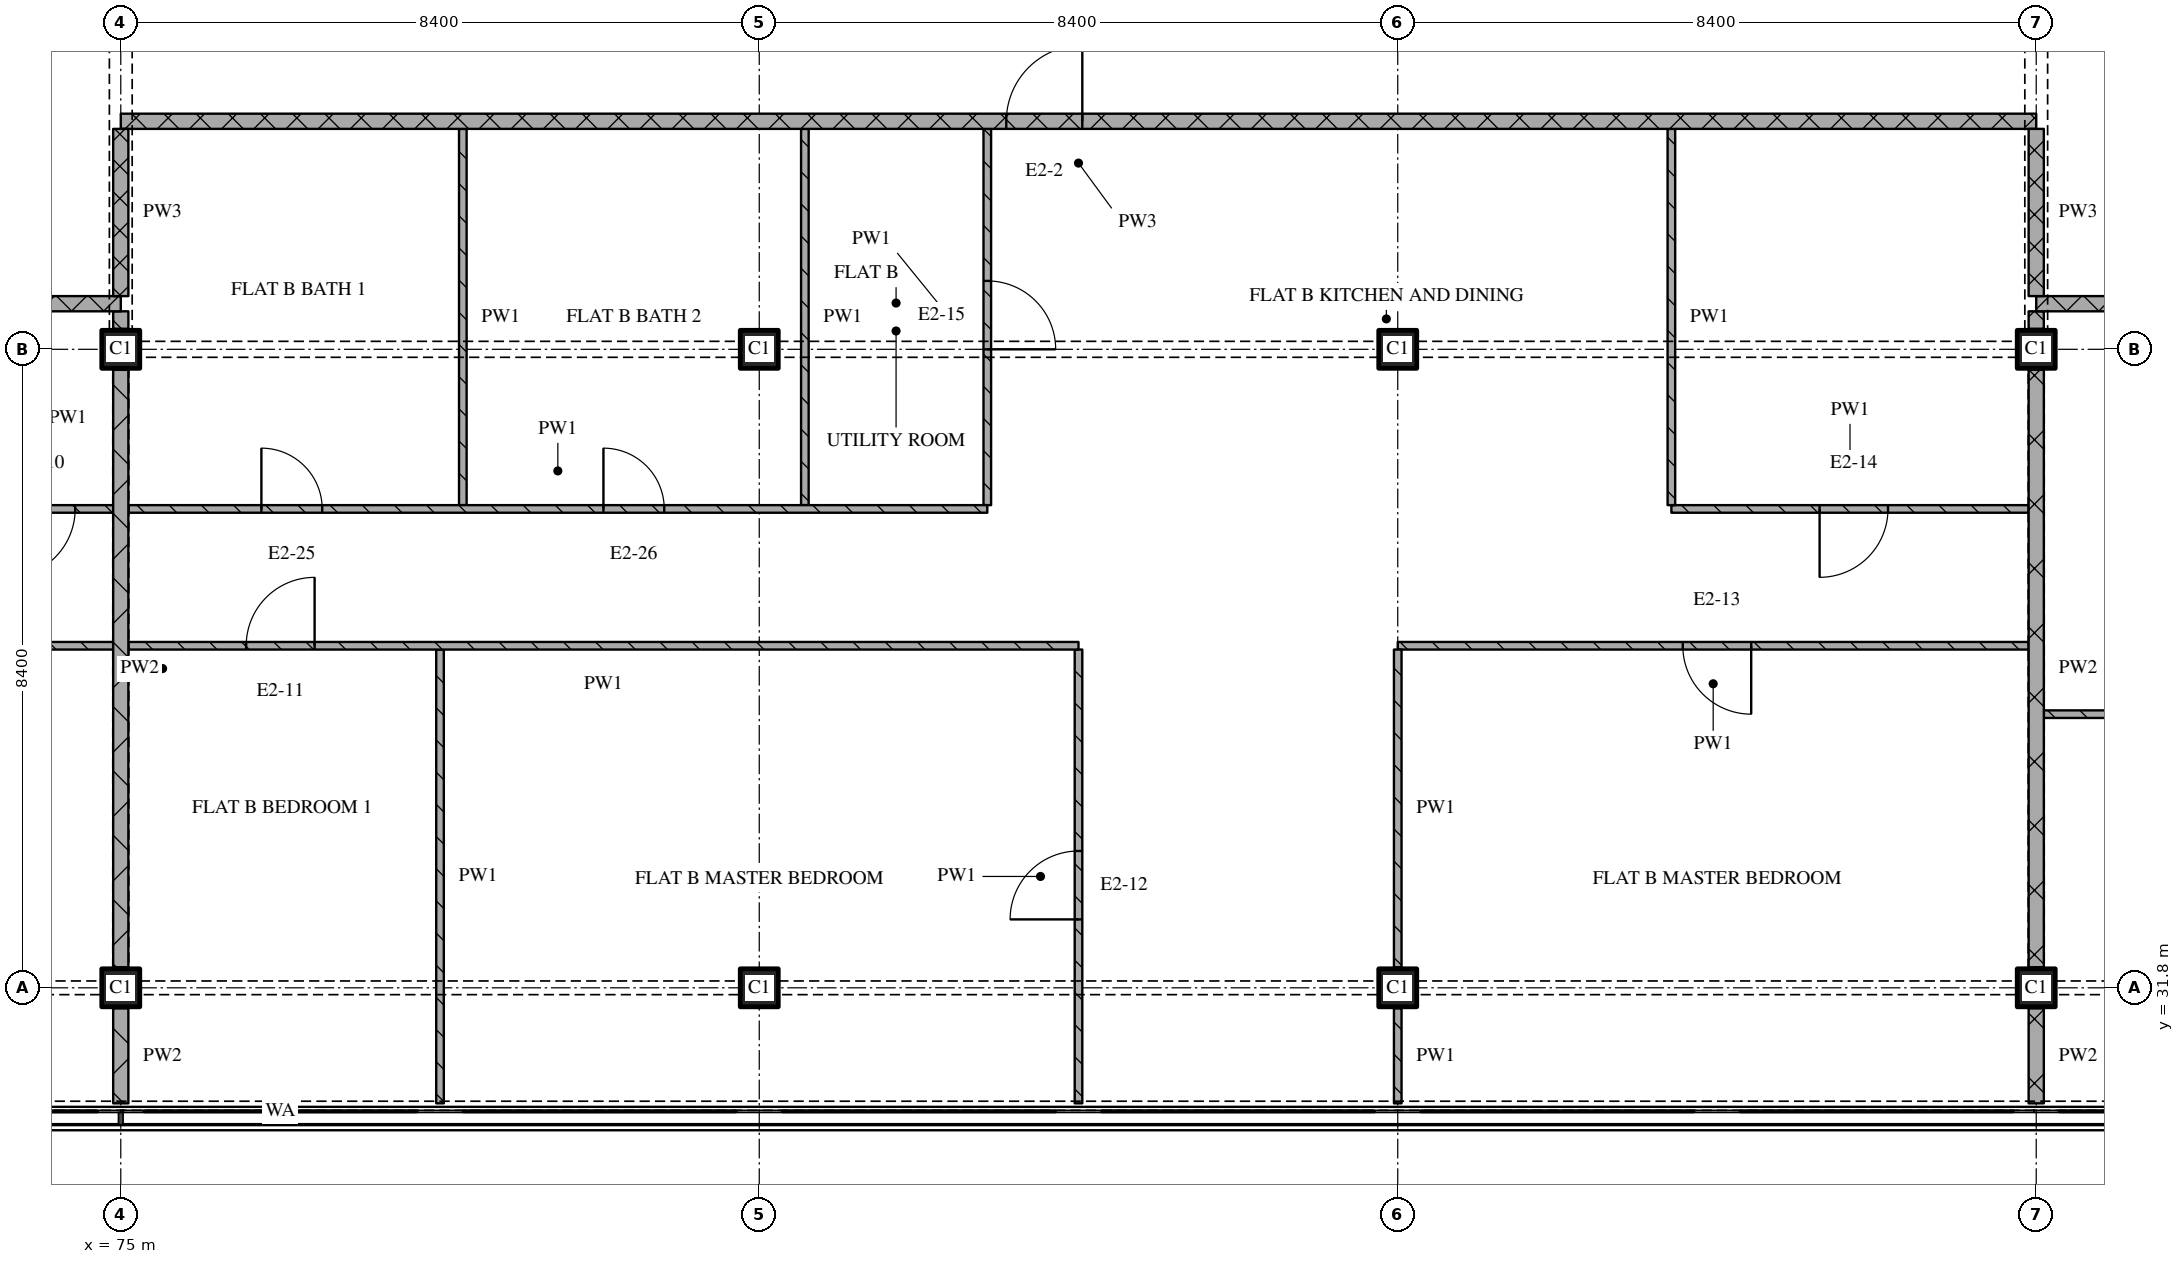
"""IFC4 building model, lengths in metres.
Left out: names, types, materials, properties, quantities, classifications, styles, units other than length and angle.
Written with IfcOpenShell. Run it as: python <this file> out.ifc"""

import sys

from ifc_helpers import new_model, si_unit, direction, frame, frame_2d, origin, origin_2d, place, context, subcontext, project, spatial, rectangle, extrude, element, fill, save


model = new_model("IFC4")
c1 = context("Model", 3, precision=1e-05, world=origin(), true_north=direction((0.0, 1.0)))
c2 = subcontext(c1, "Body", "Model", "MODEL_VIEW")
j1 = project(units=[si_unit("LENGTHUNIT", "METRE"), si_unit("PLANEANGLEUNIT", "RADIAN")], contexts=[c1])
p1 = place(None, origin())
s1 = spatial("IfcSite", under=j1, at=p1, CompositionType="ELEMENT")
p2 = place(p1, origin())
s2 = spatial("IfcBuilding", under=s1, at=p2, CompositionType="ELEMENT")
p3 = place(p2, frame((0.0, 0.0, 270.75)))
s3 = spatial("IfcBuildingStorey", under=s2, at=p3, CompositionType="ELEMENT", Elevation=270.75)
for number, where, z_axis, x_axis in (
    (1, (75.0, 31.8, 0.0), (0.0, 0.0, 1.0), (1.0, 0.0, 0.0)),
    (2, (75.0, 40.2, 0.0), (0.0, 0.0, 1.0), (1.0, 0.0, 0.0)),
    (3, (83.4, 31.8, 0.0), (0.0, 0.0, 1.0), (1.0, 0.0, 0.0)),
    (4, (83.4, 40.2, 0.0), (0.0, 0.0, 1.0), (1.0, 0.0, 0.0)),
    (5, (91.8, 31.8, 0.0), (0.0, 0.0, 1.0), (1.0, 0.0, 0.0)),
    (6, (91.8, 40.2, 0.0), (0.0, 0.0, 1.0), (1.0, 0.0, 0.0)),
    (7, (100.2, 31.8, 0.0), (0.0, 0.0, 1.0), (1.0, 0.0, 0.0)),
    (8, (100.2, 40.2, 0.0), (0.0, 0.0, 1.0), (1.0, 0.0, 0.0)),
):
    element("IfcColumn", number, at=place(p3, frame(where, z_axis=z_axis, x_axis=x_axis)), inside=s3, PredefinedType="COLUMN", context=c2, shape_type="SweptSolid", body=[
        extrude(rectangle(XDim=0.5, YDim=0.5, at=origin_2d()), origin(), (0.0, 0.0, 1.0), 3.6),
    ])
p4 = place(p3, frame((100.3, 35.4, 0.0), z_axis=(0.0, 0.0, 1.0), x_axis=(1.0, 0.0, 0.0)))
e9 = element("IfcWall", 9, at=p4, inside=s3, PredefinedType="PARTITIONING", context=c2, shape_type="SweptSolid", body=[
    extrude(rectangle(XDim=8.3, YDim=0.1, at=frame_2d((4.15, 0.0))), origin(), (0.0, 0.0, 1.0), 3.32),
])
p5 = place(p3, frame((100.1, 36.3, 0.0), z_axis=(0.0, 0.0, 1.0), x_axis=(-1.0, 0.0, 0.0)))
e10 = element("IfcWall", 10, at=p5, inside=s3, PredefinedType="PARTITIONING", context=c2, shape_type="SweptSolid", body=[
    extrude(rectangle(XDim=8.3, YDim=0.1, at=frame_2d((4.15, 0.0))), origin(), (0.0, 0.0, 1.0), 3.32),
])
p6 = place(p5, frame((3.65, 0.0, 0.0)))
e11 = element("IfcOpeningElement", 11, at=p6, cuts=e10, PredefinedType="OPENING", context=c2, shape_type="SweptSolid", body=[
    extrude(rectangle(XDim=0.9, YDim=2.1, at=frame_2d((0.45, 1.05))), frame((0.0, 0.06, 0.0), z_axis=(0.0, -1.0, 0.0), x_axis=(1.0, 0.0, 0.0)), (0.0, 0.0, 1.0), 0.12),
])
p7 = place(p3, frame((95.4, 38.1, 0.0), z_axis=(0.0, 0.0, 1.0), x_axis=(1.0, 0.0, 0.0)))
e12 = element("IfcWall", 12, at=p7, inside=s3, PredefinedType="PARTITIONING", context=c2, shape_type="SweptSolid", body=[
    extrude(rectangle(XDim=4.7, YDim=0.1, at=frame_2d((2.35, 0.0))), origin(), (0.0, 0.0, 1.0), 3.32),
])
p8 = place(p7, frame((1.95, 0.0, 0.0)))
e13 = element("IfcOpeningElement", 13, at=p8, cuts=e12, PredefinedType="OPENING", context=c2, shape_type="SweptSolid", body=[
    extrude(rectangle(XDim=0.9, YDim=2.1, at=frame_2d((0.45, 1.05))), frame((0.0, 0.06, 0.0), z_axis=(0.0, -1.0, 0.0), x_axis=(1.0, 0.0, 0.0)), (0.0, 0.0, 1.0), 0.12),
])
p9 = place(p3, frame((75.0, 40.8, 0.0), z_axis=(0.0, 0.0, 1.0), x_axis=(-1.0, 0.0, 0.0)))
e14 = element("IfcWall", 14, at=p9, inside=s3, PredefinedType="PARTITIONING", context=c2, shape_type="SweptSolid", body=[
    extrude(rectangle(XDim=18.32, YDim=0.2, at=frame_2d((9.16, 0.0))), origin(), (0.0, 0.0, 1.0), 3.32),
])
p10 = place(p9, frame((9.85, 0.0, 0.0)))
e15 = element("IfcOpeningElement", 15, at=p10, cuts=e14, PredefinedType="OPENING", context=c2, shape_type="SweptSolid", body=[
    extrude(rectangle(XDim=1.0, YDim=2.1, at=frame_2d((0.5, 1.05))), frame((0.0, 0.11, 0.0), z_axis=(0.0, -1.0, 0.0), x_axis=(1.0, 0.0, 0.0)), (0.0, 0.0, 1.0), 0.22),
])
p11 = place(p3, frame((118.52, 40.8, 0.0), z_axis=(0.0, 0.0, 1.0), x_axis=(-1.0, 0.0, 0.0)))
e16 = element("IfcWall", 16, at=p11, inside=s3, PredefinedType="PARTITIONING", context=c2, shape_type="SweptSolid", body=[
    extrude(rectangle(XDim=18.32, YDim=0.2, at=frame_2d((9.16, 0.0))), origin(), (0.0, 0.0, 1.0), 3.32),
])
p12 = place(p11, frame((7.17, 0.0, 0.0)))
e17 = element("IfcOpeningElement", 17, at=p12, cuts=e16, PredefinedType="OPENING", context=c2, shape_type="SweptSolid", body=[
    extrude(rectangle(XDim=1.0, YDim=2.1, at=frame_2d((0.5, 1.05))), frame((0.0, 0.11, 0.0), z_axis=(0.0, -1.0, 0.0), x_axis=(1.0, 0.0, 0.0)), (0.0, 0.0, 1.0), 0.22),
])
p13 = place(p3, frame((100.2, 43.2, 0.0), z_axis=(0.0, 0.0, 1.0), x_axis=(-1.0, 0.0, 0.0)))
e18 = element("IfcWall", 18, at=p13, inside=s3, PredefinedType="PARTITIONING", context=c2, shape_type="SweptSolid", body=[
    extrude(rectangle(XDim=25.2, YDim=0.2, at=frame_2d((12.6, 0.0))), origin(), (0.0, 0.0, 1.0), 3.32),
])
p14 = place(p13, frame((12.55, 0.0, 0.0)))
e19 = element("IfcOpeningElement", 19, at=p14, cuts=e18, PredefinedType="OPENING", context=c2, shape_type="SweptSolid", body=[
    extrude(rectangle(XDim=1.0, YDim=2.1, at=frame_2d((0.5, 1.05))), frame((0.0, 0.11, 0.0), z_axis=(0.0, -1.0, 0.0), x_axis=(1.0, 0.0, 0.0)), (0.0, 0.0, 1.0), 0.22),
])
p15 = place(p3, frame((75.0, 43.1, 0.0), z_axis=(0.0, 0.0, 1.0), x_axis=(0.0, -1.0, 0.0)))
e20 = element("IfcWall", 20, at=p15, inside=s3, PredefinedType="PARTITIONING", context=c2, shape_type="SweptSolid", body=[
    extrude(rectangle(XDim=2.2, YDim=0.2, at=frame_2d((1.1, 0.0))), origin(), (0.0, 0.0, 1.0), 2.53),
])
p16 = place(p3, frame((75.0, 31.53, 0.0), z_axis=(0.0, 0.0, 1.0), x_axis=(0.0, -1.0, 0.0)))
e21 = element("IfcWall", 21, at=p16, inside=s3, PredefinedType="PARTITIONING", context=c2, shape_type="SweptSolid", body=[
    extrude(rectangle(XDim=1.25, YDim=0.2, at=frame_2d((0.625, 0.0))), origin(), (0.0, 0.0, 1.0), 3.32),
])
p17 = place(p3, frame((75.0, 39.93, 0.0), z_axis=(0.0, 0.0, 1.0), x_axis=(0.0, -1.0, 0.0)))
e22 = element("IfcWall", 22, at=p17, inside=s3, PredefinedType="PARTITIONING", context=c2, shape_type="SweptSolid", body=[
    extrude(rectangle(XDim=7.86, YDim=0.2, at=frame_2d((3.93, 0.0))), origin(), (0.0, 0.0, 1.0), 2.77),
])
p18 = place(p3, frame((75.0, 40.7, 0.0), z_axis=(0.0, 0.0, 1.0), x_axis=(0.0, -1.0, 0.0)))
e23 = element("IfcWall", 23, at=p18, inside=s3, PredefinedType="PARTITIONING", context=c2, shape_type="SweptSolid", body=[
    extrude(rectangle(XDim=0.23, YDim=0.2, at=frame_2d((0.115, 0.0))), origin(), (0.0, 0.0, 1.0), 3.32),
])
p19 = place(p3, frame((79.2, 36.25, 0.0), z_axis=(0.0, 0.0, 1.0), x_axis=(0.0, -1.0, 0.0)))
e24 = element("IfcWall", 24, at=p19, inside=s3, PredefinedType="PARTITIONING", context=c2, shape_type="SweptSolid", body=[
    extrude(rectangle(XDim=5.97, YDim=0.1, at=frame_2d((2.985, 0.0))), origin(), (0.0, 0.0, 1.0), 3.32),
])
for number, where, z_axis, x_axis in (
    (25, (79.5, 43.1, 0.0), (0.0, 0.0, 1.0), (0.0, -1.0, 0.0)),
    (26, (84.0, 43.1, 0.0), (0.0, 0.0, 1.0), (0.0, -1.0, 0.0)),
):
    element("IfcWall", number, at=place(p3, frame(where, z_axis=z_axis, x_axis=x_axis)), inside=s3, PredefinedType="PARTITIONING", context=c2, shape_type="SweptSolid", body=[
        extrude(rectangle(XDim=4.95, YDim=0.1, at=frame_2d((2.475, 0.0))), origin(), (0.0, 0.0, 1.0), 3.32),
    ])
p20 = place(p3, frame((86.4, 38.15, 0.0), z_axis=(0.0, 0.0, 1.0), x_axis=(0.0, 1.0, 0.0)))
e27 = element("IfcWall", 27, at=p20, inside=s3, PredefinedType="PARTITIONING", context=c2, shape_type="SweptSolid", body=[
    extrude(rectangle(XDim=4.95, YDim=0.1, at=frame_2d((2.475, 0.0))), origin(), (0.0, 0.0, 1.0), 3.32),
])
p21 = place(p20, frame((2.05, 0.0, 0.0)))
e28 = element("IfcOpeningElement", 28, at=p21, cuts=e27, PredefinedType="OPENING", context=c2, shape_type="SweptSolid", body=[
    extrude(rectangle(XDim=0.9, YDim=2.1, at=frame_2d((0.45, 1.05))), frame((0.0, 0.06, 0.0), z_axis=(0.0, -1.0, 0.0), x_axis=(1.0, 0.0, 0.0)), (0.0, 0.0, 1.0), 0.12),
])
p22 = place(p3, frame((87.6, 30.28, 0.0), z_axis=(0.0, 0.0, 1.0), x_axis=(0.0, 1.0, 0.0)))
e29 = element("IfcWall", 29, at=p22, inside=s3, PredefinedType="PARTITIONING", context=c2, shape_type="SweptSolid", body=[
    extrude(rectangle(XDim=5.97, YDim=0.1, at=frame_2d((2.985, 0.0))), origin(), (0.0, 0.0, 1.0), 3.32),
])
p23 = place(p22, frame((2.42, 0.0, 0.0)))
e30 = element("IfcOpeningElement", 30, at=p23, cuts=e29, PredefinedType="OPENING", context=c2, shape_type="SweptSolid", body=[
    extrude(rectangle(XDim=0.9, YDim=2.1, at=frame_2d((0.45, 1.05))), frame((0.0, 0.06, 0.0), z_axis=(0.0, -1.0, 0.0), x_axis=(1.0, 0.0, 0.0)), (0.0, 0.0, 1.0), 0.12),
])
p24 = place(p3, frame((91.8, 31.53, 0.0), z_axis=(0.0, 0.0, 1.0), x_axis=(0.0, -1.0, 0.0)))
e31 = element("IfcWall", 31, at=p24, inside=s3, PredefinedType="PARTITIONING", context=c2, shape_type="SweptSolid", body=[
    extrude(rectangle(XDim=1.25, YDim=0.1, at=frame_2d((0.625, 0.0))), origin(), (0.0, 0.0, 1.0), 3.32),
])
p25 = place(p3, frame((91.8, 36.25, 0.0), z_axis=(0.0, 0.0, 1.0), x_axis=(0.0, -1.0, 0.0)))
e32 = element("IfcWall", 32, at=p25, inside=s3, PredefinedType="PARTITIONING", context=c2, shape_type="SweptSolid", body=[
    extrude(rectangle(XDim=4.18, YDim=0.1, at=frame_2d((2.09, 0.0))), origin(), (0.0, 0.0, 1.0), 3.32),
])
p26 = place(p3, frame((95.4, 43.1, 0.0), z_axis=(0.0, 0.0, 1.0), x_axis=(0.0, -1.0, 0.0)))
e33 = element("IfcWall", 33, at=p26, inside=s3, PredefinedType="PARTITIONING", context=c2, shape_type="SweptSolid", body=[
    extrude(rectangle(XDim=4.95, YDim=0.1, at=frame_2d((2.475, 0.0))), origin(), (0.0, 0.0, 1.0), 3.32),
])
p27 = place(p3, frame((100.2, 43.1, 0.0), z_axis=(0.0, 0.0, 1.0), x_axis=(0.0, -1.0, 0.0)))
e34 = element("IfcWall", 34, at=p27, inside=s3, PredefinedType="PARTITIONING", context=c2, shape_type="SweptSolid", body=[
    extrude(rectangle(XDim=2.2, YDim=0.2, at=frame_2d((1.1, 0.0))), origin(), (0.0, 0.0, 1.0), 2.53),
])
p28 = place(p3, frame((100.2, 31.53, 0.0), z_axis=(0.0, 0.0, 1.0), x_axis=(0.0, -1.0, 0.0)))
e35 = element("IfcWall", 35, at=p28, inside=s3, PredefinedType="PARTITIONING", context=c2, shape_type="SweptSolid", body=[
    extrude(rectangle(XDim=1.25, YDim=0.2, at=frame_2d((0.625, 0.0))), origin(), (0.0, 0.0, 1.0), 3.32),
])
p29 = place(p3, frame((100.2, 39.93, 0.0), z_axis=(0.0, 0.0, 1.0), x_axis=(0.0, -1.0, 0.0)))
e36 = element("IfcWall", 36, at=p29, inside=s3, PredefinedType="PARTITIONING", context=c2, shape_type="SweptSolid", body=[
    extrude(rectangle(XDim=7.86, YDim=0.2, at=frame_2d((3.93, 0.0))), origin(), (0.0, 0.0, 1.0), 2.77),
])
p30 = place(p3, frame((100.2, 40.7, 0.0), z_axis=(0.0, 0.0, 1.0), x_axis=(0.0, -1.0, 0.0)))
e37 = element("IfcWall", 37, at=p30, inside=s3, PredefinedType="PARTITIONING", context=c2, shape_type="SweptSolid", body=[
    extrude(rectangle(XDim=0.23, YDim=0.2, at=frame_2d((0.115, 0.0))), origin(), (0.0, 0.0, 1.0), 3.32),
])
p31 = place(p3, frame((74.9, 36.3, 0.0), z_axis=(0.0, 0.0, 1.0), x_axis=(-1.0, 0.0, 0.0)))
e38 = element("IfcWall", 38, at=p31, inside=s3, PredefinedType="PARTITIONING", context=c2, shape_type="SweptSolid", body=[
    extrude(rectangle(XDim=8.3, YDim=0.1, at=frame_2d((4.15, 0.0))), origin(), (0.0, 0.0, 1.0), 3.32),
])
p32 = place(p31, frame((3.65, 0.0, 0.0)))
e39 = element("IfcOpeningElement", 39, at=p32, cuts=e38, PredefinedType="OPENING", context=c2, shape_type="SweptSolid", body=[
    extrude(rectangle(XDim=0.9, YDim=2.1, at=frame_2d((0.45, 1.05))), frame((0.0, 0.06, 0.0), z_axis=(0.0, -1.0, 0.0), x_axis=(1.0, 0.0, 0.0)), (0.0, 0.0, 1.0), 0.12),
])
p33 = place(p3, frame((87.6, 36.3, 0.0), z_axis=(0.0, 0.0, 1.0), x_axis=(-1.0, 0.0, 0.0)))
e40 = element("IfcWall", 40, at=p33, inside=s3, PredefinedType="PARTITIONING", context=c2, shape_type="SweptSolid", body=[
    extrude(rectangle(XDim=12.5, YDim=0.1, at=frame_2d((6.25, 0.0))), origin(), (0.0, 0.0, 1.0), 3.32),
])
p34 = place(p33, frame((10.05, 0.0, 0.0)))
e41 = element("IfcOpeningElement", 41, at=p34, cuts=e40, PredefinedType="OPENING", context=c2, shape_type="SweptSolid", body=[
    extrude(rectangle(XDim=0.9, YDim=2.1, at=frame_2d((0.45, 1.05))), frame((0.0, 0.06, 0.0), z_axis=(0.0, -1.0, 0.0), x_axis=(1.0, 0.0, 0.0)), (0.0, 0.0, 1.0), 0.12),
])
p35 = place(p3, frame((72.9, 38.1, 0.0), z_axis=(0.0, 0.0, 1.0), x_axis=(1.0, 0.0, 0.0)))
e42 = element("IfcWall", 42, at=p35, inside=s3, PredefinedType="PARTITIONING", context=c2, shape_type="SweptSolid", body=[
    extrude(rectangle(XDim=2.0, YDim=0.1, at=frame_2d((1.0, 0.0))), origin(), (0.0, 0.0, 1.0), 3.32),
])
p36 = place(p35, frame((0.6, 0.0, 0.0)))
e43 = element("IfcOpeningElement", 43, at=p36, cuts=e42, PredefinedType="OPENING", context=c2, shape_type="SweptSolid", body=[
    extrude(rectangle(XDim=0.9, YDim=2.1, at=frame_2d((0.45, 1.05))), frame((0.0, 0.06, 0.0), z_axis=(0.0, -1.0, 0.0), x_axis=(1.0, 0.0, 0.0)), (0.0, 0.0, 1.0), 0.12),
])
p37 = place(p3, frame((75.1, 38.1, 0.0), z_axis=(0.0, 0.0, 1.0), x_axis=(1.0, 0.0, 0.0)))
e44 = element("IfcWall", 44, at=p37, inside=s3, PredefinedType="PARTITIONING", context=c2, shape_type="SweptSolid", body=[
    extrude(rectangle(XDim=11.3, YDim=0.1, at=frame_2d((5.65, 0.0))), origin(), (0.0, 0.0, 1.0), 3.32),
])
p38 = place(p37, frame((1.75, 0.0, 0.0)))
e45 = element("IfcOpeningElement", 45, at=p38, cuts=e44, PredefinedType="OPENING", context=c2, shape_type="SweptSolid", body=[
    extrude(rectangle(XDim=0.8, YDim=2.1, at=frame_2d((0.4, 1.05))), frame((0.0, 0.06, 0.0), z_axis=(0.0, -1.0, 0.0), x_axis=(1.0, 0.0, 0.0)), (0.0, 0.0, 1.0), 0.12),
])
p39 = place(p37, frame((6.25, 0.0, 0.0)))
e46 = element("IfcOpeningElement", 46, at=p39, cuts=e44, PredefinedType="OPENING", context=c2, shape_type="SweptSolid", body=[
    extrude(rectangle(XDim=0.8, YDim=2.1, at=frame_2d((0.4, 1.05))), frame((0.0, 0.06, 0.0), z_axis=(0.0, -1.0, 0.0), x_axis=(1.0, 0.0, 0.0)), (0.0, 0.0, 1.0), 0.12),
])
p40 = place(p6, origin())
e47 = element("IfcDoor", 47, at=p40, inside=s3, OperationType="SINGLE_SWING_LEFT", PredefinedType="DOOR", context=c2, shape_type="SweptSolid", body=[
    extrude(rectangle(XDim=0.9, YDim=2.1, at=frame_2d((0.45, 1.05))), frame((0.0, 0.025, 0.0), z_axis=(0.0, -1.0, 0.0), x_axis=(1.0, 0.0, 0.0)), (0.0, 0.0, 1.0), 0.05),
])
fill(e11, e47)
p41 = place(p8, origin())
e48 = element("IfcDoor", 48, at=p41, inside=s3, OperationType="SINGLE_SWING_RIGHT", PredefinedType="DOOR", context=c2, shape_type="SweptSolid", body=[
    extrude(rectangle(XDim=0.9, YDim=2.1, at=frame_2d((0.45, 1.05))), frame((0.0, 0.025, 0.0), z_axis=(0.0, -1.0, 0.0), x_axis=(1.0, 0.0, 0.0)), (0.0, 0.0, 1.0), 0.05),
])
fill(e13, e48)
p42 = place(p14, origin())
e49 = element("IfcDoor", 49, at=p42, inside=s3, OperationType="SINGLE_SWING_RIGHT", PredefinedType="DOOR", context=c2, shape_type="SweptSolid", body=[
    extrude(rectangle(XDim=1.0, YDim=2.1, at=frame_2d((0.5, 1.05))), frame((0.0, 0.025, 0.0), z_axis=(0.0, -1.0, 0.0), x_axis=(1.0, 0.0, 0.0)), (0.0, 0.0, 1.0), 0.05),
])
fill(e19, e49)
p43 = place(p21, origin())
e50 = element("IfcDoor", 50, at=p43, inside=s3, OperationType="SINGLE_SWING_RIGHT", PredefinedType="DOOR", context=c2, shape_type="SweptSolid", body=[
    extrude(rectangle(XDim=0.9, YDim=2.1, at=frame_2d((0.45, 1.05))), frame((0.0, 0.025, 0.0), z_axis=(0.0, -1.0, 0.0), x_axis=(1.0, 0.0, 0.0)), (0.0, 0.0, 1.0), 0.05),
])
fill(e28, e50)
p44 = place(p23, origin())
e51 = element("IfcDoor", 51, at=p44, inside=s3, OperationType="SINGLE_SWING_LEFT", PredefinedType="DOOR", context=c2, shape_type="SweptSolid", body=[
    extrude(rectangle(XDim=0.9, YDim=2.1, at=frame_2d((0.45, 1.05))), frame((0.0, 0.025, 0.0), z_axis=(0.0, -1.0, 0.0), x_axis=(1.0, 0.0, 0.0)), (0.0, 0.0, 1.0), 0.05),
])
fill(e30, e51)
p45 = place(p34, origin())
e52 = element("IfcDoor", 52, at=p45, inside=s3, OperationType="SINGLE_SWING_RIGHT", PredefinedType="DOOR", context=c2, shape_type="SweptSolid", body=[
    extrude(rectangle(XDim=0.9, YDim=2.1, at=frame_2d((0.45, 1.05))), frame((0.0, 0.025, 0.0), z_axis=(0.0, -1.0, 0.0), x_axis=(1.0, 0.0, 0.0)), (0.0, 0.0, 1.0), 0.05),
])
fill(e41, e52)
p46 = place(p36, origin())
e53 = element("IfcDoor", 53, at=p46, inside=s3, OperationType="SINGLE_SWING_RIGHT", PredefinedType="DOOR", context=c2, shape_type="SweptSolid", body=[
    extrude(rectangle(XDim=0.9, YDim=2.1, at=frame_2d((0.45, 1.05))), frame((0.0, 0.025, 0.0), z_axis=(0.0, -1.0, 0.0), x_axis=(1.0, 0.0, 0.0)), (0.0, 0.0, 1.0), 0.05),
])
fill(e43, e53)
p47 = place(p38, origin())
e54 = element("IfcDoor", 54, at=p47, inside=s3, OperationType="SINGLE_SWING_LEFT", PredefinedType="DOOR", context=c2, shape_type="SweptSolid", body=[
    extrude(rectangle(XDim=0.8, YDim=2.1, at=frame_2d((0.4, 1.05))), frame((0.0, 0.025, 0.0), z_axis=(0.0, -1.0, 0.0), x_axis=(1.0, 0.0, 0.0)), (0.0, 0.0, 1.0), 0.05),
])
fill(e45, e54)
p48 = place(p39, origin())
e55 = element("IfcDoor", 55, at=p48, inside=s3, OperationType="SINGLE_SWING_LEFT", PredefinedType="DOOR", context=c2, shape_type="SweptSolid", body=[
    extrude(rectangle(XDim=0.8, YDim=2.1, at=frame_2d((0.4, 1.05))), frame((0.0, 0.025, 0.0), z_axis=(0.0, -1.0, 0.0), x_axis=(1.0, 0.0, 0.0)), (0.0, 0.0, 1.0), 0.05),
])
fill(e46, e55)
save(model, sys.argv[1])
